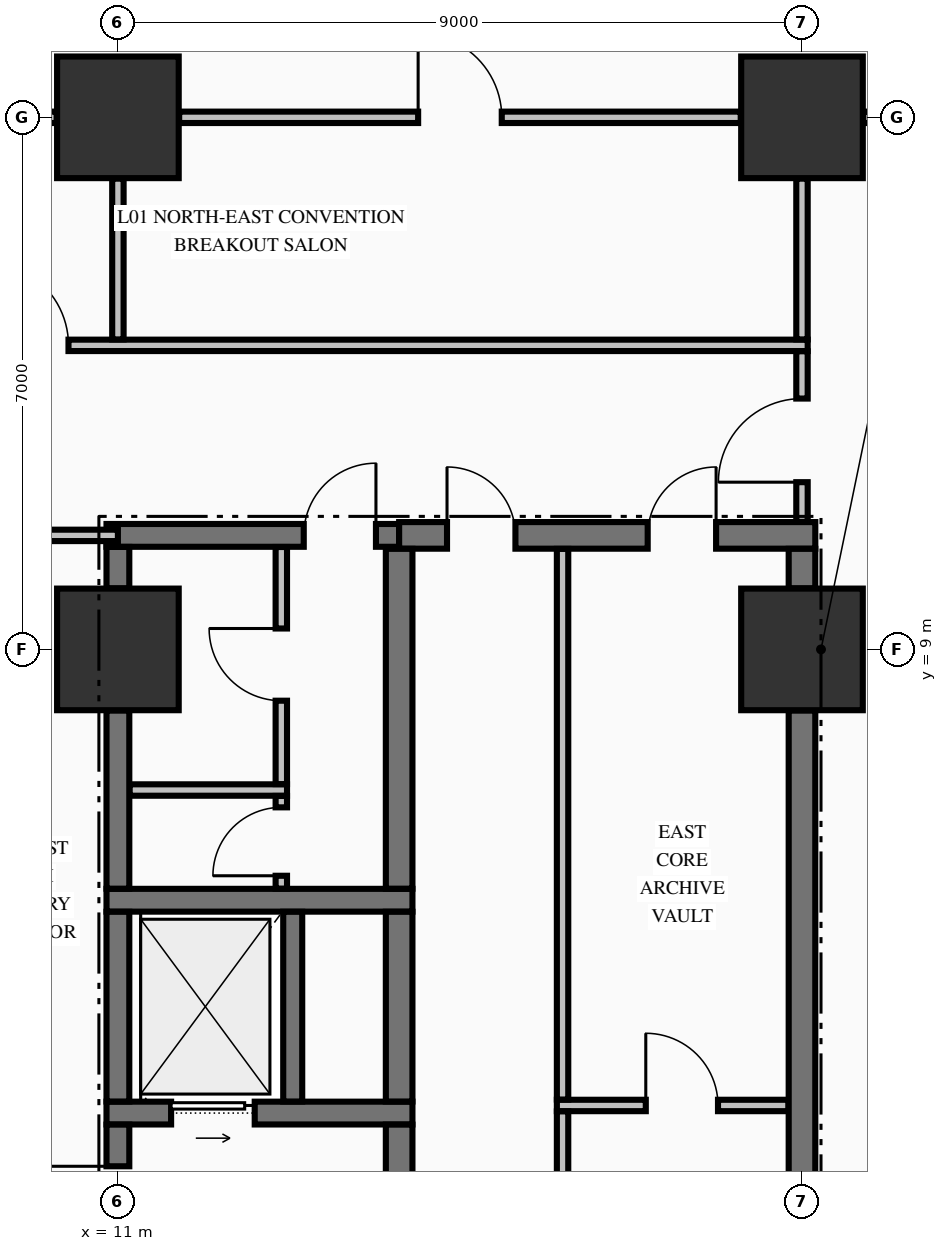
"""IFC4 building model, lengths in metres.
Left out: names, types, materials, properties, quantities, classifications, styles, units other than length and angle.
Written with IfcOpenShell. Run it as: python <this file> out.ifc"""

import sys

from ifc_helpers import new_model, si_unit, direction, frame, frame_2d, origin, origin_2d, place, context, subcontext, project, spatial, rectangle, extrude, element, fill, save


model = new_model("IFC4")
c1 = context("Model", 3, precision=1e-05, world=origin(), true_north=direction((0.0, 1.0)))
c2 = subcontext(c1, "Body", "Model", "MODEL_VIEW")
j1 = project(units=[si_unit("LENGTHUNIT", "METRE"), si_unit("PLANEANGLEUNIT", "RADIAN")], contexts=[c1])
p1 = place(None, origin())
s1 = spatial("IfcSite", under=j1, at=p1, CompositionType="ELEMENT")
p2 = place(p1, origin())
s2 = spatial("IfcBuilding", under=s1, at=p2, CompositionType="ELEMENT")
p3 = place(p2, frame((0.0, 0.0, 5.44)))
s3 = spatial("IfcBuildingStorey", under=s2, at=p3, CompositionType="ELEMENT", Elevation=5.44)
for number, where, z_axis, x_axis in (
    (1, (11.0, 9.0, 0.0), (0.0, 0.0, 1.0), (1.0, 0.0, 0.0)),
    (2, (11.0, 16.0, 0.0), (0.0, 0.0, 1.0), (1.0, 0.0, 0.0)),
    (3, (20.0, 9.0, 0.0), (0.0, 0.0, 1.0), (1.0, 0.0, 0.0)),
    (4, (20.0, 16.0, 0.0), (0.0, 0.0, 1.0), (1.0, 0.0, 0.0)),
):
    element("IfcColumn", number, at=place(p3, frame(where, z_axis=z_axis, x_axis=x_axis)), inside=s3, PredefinedType="COLUMN", context=c2, shape_type="SweptSolid", body=[
        extrude(rectangle(XDim=1.6, YDim=1.6, at=origin_2d()), origin(), (0.0, 0.0, 1.0), 5.09),
    ])
p4 = place(p3, frame((10.85, 2.9, 0.0), z_axis=(0.0, 0.0, 1.0), x_axis=(1.0, 0.0, 0.0)))
e5 = element("IfcWall", 5, at=p4, inside=s3, PredefinedType="SHEAR", context=c2, shape_type="SweptSolid", body=[
    extrude(rectangle(XDim=4.025, YDim=0.3, at=frame_2d((2.012, 0.0))), origin(), (0.0, 0.0, 1.0), 5.09),
])
p5 = place(p4, frame((0.85, 0.0, 0.0)))
e6 = element("IfcOpeningElement", 6, at=p5, cuts=e5, PredefinedType="OPENING", context=c2, shape_type="SweptSolid", body=[
    extrude(rectangle(XDim=1.1, YDim=2.2, at=frame_2d((0.55, 1.1))), frame((0.0, 0.16, 0.0), z_axis=(0.0, -1.0, 0.0), x_axis=(1.0, 0.0, 0.0)), (0.0, 0.0, 1.0), 0.32),
])
p6 = place(p3, frame((10.85, 5.7, 0.0), z_axis=(0.0, 0.0, 1.0), x_axis=(1.0, 0.0, 0.0)))
e7 = element("IfcWall", 7, at=p6, inside=s3, PredefinedType="SHEAR", context=c2, shape_type="SweptSolid", body=[
    extrude(rectangle(XDim=4.025, YDim=0.3, at=frame_2d((2.012, 0.0))), origin(), (0.0, 0.0, 1.0), 5.09),
])
p7 = place(p3, frame((10.85, 10.5, 0.0), z_axis=(0.0, 0.0, 1.0), x_axis=(1.0, 0.0, 0.0)))
e8 = element("IfcWall", 8, at=p7, inside=s3, PredefinedType="SHEAR", context=c2, shape_type="SweptSolid", body=[
    extrude(rectangle(XDim=3.85, YDim=0.3, at=frame_2d((1.925, 0.0))), origin(), (0.0, 0.0, 1.0), 5.09),
])
p8 = place(p7, frame((2.595, 0.0, 0.0)))
e9 = element("IfcOpeningElement", 9, at=p8, cuts=e8, PredefinedType="OPENING", context=c2, shape_type="SweptSolid", body=[
    extrude(rectangle(XDim=0.95, YDim=2.15, at=frame_2d((0.475, 1.075))), frame((0.0, 0.16, 0.0), z_axis=(0.0, -1.0, 0.0), x_axis=(1.0, 0.0, 0.0)), (0.0, 0.0, 1.0), 0.32),
])
p9 = place(p3, frame((14.7, 10.5, 0.0), z_axis=(0.0, 0.0, 1.0), x_axis=(1.0, 0.0, 0.0)))
e10 = element("IfcWall", 10, at=p9, inside=s3, PredefinedType="SHEAR", context=c2, shape_type="SweptSolid", body=[
    extrude(rectangle(XDim=5.475, YDim=0.35, at=frame_2d((2.738, 0.0))), origin(), (0.0, 0.0, 1.0), 5.09),
])
p10 = place(p9, frame((0.63, 0.0, 0.0)))
e11 = element("IfcOpeningElement", 11, at=p10, cuts=e10, PredefinedType="OPENING", context=c2, shape_type="SweptSolid", body=[
    extrude(rectangle(XDim=0.9, YDim=2.15, at=frame_2d((0.45, 1.075))), frame((0.0, 0.185, 0.0), z_axis=(0.0, -1.0, 0.0), x_axis=(1.0, 0.0, 0.0)), (0.0, 0.0, 1.0), 0.37),
])
p11 = place(p9, frame((3.27, 0.0, 0.0)))
e12 = element("IfcOpeningElement", 12, at=p11, cuts=e10, PredefinedType="OPENING", context=c2, shape_type="SweptSolid", body=[
    extrude(rectangle(XDim=0.9, YDim=2.15, at=frame_2d((0.45, 1.075))), frame((0.0, 0.185, 0.0), z_axis=(0.0, -1.0, 0.0), x_axis=(1.0, 0.0, 0.0)), (0.0, 0.0, 1.0), 0.37),
])
p12 = place(p3, frame((16.775, 3.0, 0.0), z_axis=(0.0, 0.0, 1.0), x_axis=(1.0, 0.0, 0.0)))
e13 = element("IfcWall", 13, at=p12, inside=s3, PredefinedType="PARTITIONING", context=c2, shape_type="SweptSolid", body=[
    extrude(rectangle(XDim=3.047, YDim=0.15, at=frame_2d((1.523, 0.0))), origin(), (0.0, 0.0, 1.0), 5.09),
])
p13 = place(p12, frame((1.17, 0.0, 0.0)))
e14 = element("IfcOpeningElement", 14, at=p13, cuts=e13, PredefinedType="OPENING", context=c2, shape_type="SweptSolid", body=[
    extrude(rectangle(XDim=0.95, YDim=2.15, at=frame_2d((0.475, 1.075))), frame((0.0, 0.085, 0.0), z_axis=(0.0, -1.0, 0.0), x_axis=(1.0, 0.0, 0.0)), (0.0, 0.0, 1.0), 0.17),
])
p14 = place(p3, frame((11.153, 7.15, 0.0), z_axis=(0.0, 0.0, 1.0), x_axis=(1.0, 0.0, 0.0)))
e15 = element("IfcWall", 15, at=p14, inside=s3, PredefinedType="PARTITIONING", context=c2, shape_type="SweptSolid", body=[
    extrude(rectangle(XDim=2.072, YDim=0.15, at=frame_2d((1.036, 0.0))), origin(), (0.0, 0.0, 1.0), 5.09),
])
p15 = place(p3, frame((8.66, 10.5, 0.0), z_axis=(0.0, 0.0, 1.0), x_axis=(1.0, 0.0, 0.0)))
e16 = element("IfcWall", 16, at=p15, inside=s3, PredefinedType="PARTITIONING", context=c2, shape_type="SweptSolid", body=[
    extrude(rectangle(XDim=2.34, YDim=0.15, at=frame_2d((1.17, 0.0))), origin(), (0.0, 0.0, 1.0), 5.09),
])
p16 = place(p15, frame((0.27, 0.0, 0.0)))
e17 = element("IfcOpeningElement", 17, at=p16, cuts=e16, PredefinedType="OPENING", context=c2, shape_type="SweptSolid", body=[
    extrude(rectangle(XDim=1.1, YDim=2.15, at=frame_2d((0.55, 1.075))), frame((0.0, 0.085, 0.0), z_axis=(0.0, -1.0, 0.0), x_axis=(1.0, 0.0, 0.0)), (0.0, 0.0, 1.0), 0.17),
])
p17 = place(p3, frame((8.66, 13.0, 0.0), z_axis=(0.0, 0.0, 1.0), x_axis=(1.0, 0.0, 0.0)))
e18 = element("IfcWall", 18, at=p17, inside=s3, PredefinedType="PARTITIONING", context=c2, shape_type="SweptSolid", body=[
    extrude(rectangle(XDim=11.415, YDim=0.15, at=frame_2d((5.708, 0.0))), origin(), (0.0, 0.0, 1.0), 5.09),
])
p18 = place(p17, frame((0.59, 0.0, 0.0)))
e19 = element("IfcOpeningElement", 19, at=p18, cuts=e18, PredefinedType="OPENING", context=c2, shape_type="SweptSolid", body=[
    extrude(rectangle(XDim=1.1, YDim=2.15, at=frame_2d((0.55, 1.075))), frame((0.0, 0.085, 0.0), z_axis=(0.0, -1.0, 0.0), x_axis=(1.0, 0.0, 0.0)), (0.0, 0.0, 1.0), 0.17),
])
p19 = place(p3, frame((9.206, 16.0, 0.0), z_axis=(0.0, 0.0, 1.0), x_axis=(1.0, 0.0, 0.0)))
e20 = element("IfcWall", 20, at=p19, inside=s3, PredefinedType="PARTITIONING", context=c2, shape_type="SweptSolid", body=[
    extrude(rectangle(XDim=0.988, YDim=0.15, at=frame_2d((0.494, 0.0))), origin(), (0.0, 0.0, 1.0), 4.132),
])
p20 = place(p3, frame((11.806, 16.0, 0.0), z_axis=(0.0, 0.0, 1.0), x_axis=(1.0, 0.0, 0.0)))
e21 = element("IfcWall", 21, at=p20, inside=s3, PredefinedType="PARTITIONING", context=c2, shape_type="SweptSolid", body=[
    extrude(rectangle(XDim=7.388, YDim=0.15, at=frame_2d((3.694, 0.0))), origin(), (0.0, 0.0, 1.0), 4.132),
])
p21 = place(p20, frame((3.144, 0.0, 0.0)))
e22 = element("IfcOpeningElement", 22, at=p21, cuts=e21, PredefinedType="OPENING", context=c2, shape_type="SweptSolid", body=[
    extrude(rectangle(XDim=1.1, YDim=2.15, at=frame_2d((0.55, 1.075))), frame((0.0, 0.085, 0.0), z_axis=(0.0, -1.0, 0.0), x_axis=(1.0, 0.0, 0.0)), (0.0, 0.0, 1.0), 0.17),
])
p22 = place(p3, frame((20.806, 16.0, 0.0), z_axis=(0.0, 0.0, 1.0), x_axis=(1.0, 0.0, 0.0)))
e23 = element("IfcWall", 23, at=p22, inside=s3, PredefinedType="PARTITIONING", context=c2, shape_type="SweptSolid", body=[
    extrude(rectangle(XDim=4.488, YDim=0.15, at=frame_2d((2.244, 0.0))), origin(), (0.0, 0.0, 1.0), 4.132),
])
p23 = place(p22, frame((0.15, 0.0, 0.0)))
e24 = element("IfcOpeningElement", 24, at=p23, cuts=e23, PredefinedType="OPENING", context=c2, shape_type="SweptSolid", body=[
    extrude(rectangle(XDim=1.1, YDim=2.15, at=frame_2d((0.55, 1.075))), frame((0.0, 0.085, 0.0), z_axis=(0.0, -1.0, 0.0), x_axis=(1.0, 0.0, 0.0)), (0.0, 0.0, 1.0), 0.17),
])
p24 = place(p22, frame((2.844, 0.0, 0.0)))
e25 = element("IfcOpeningElement", 25, at=p24, cuts=e23, PredefinedType="OPENING", context=c2, shape_type="SweptSolid", body=[
    extrude(rectangle(XDim=1.1, YDim=2.15, at=frame_2d((0.55, 1.075))), frame((0.0, 0.085, 0.0), z_axis=(0.0, -1.0, 0.0), x_axis=(1.0, 0.0, 0.0)), (0.0, 0.0, 1.0), 0.17),
])
p25 = place(p3, frame((11.0, 0.804, 0.0), z_axis=(0.0, 0.0, 1.0), x_axis=(0.0, 1.0, 0.0)))
e26 = element("IfcWall", 26, at=p25, inside=s3, PredefinedType="SHEAR", context=c2, shape_type="SweptSolid", body=[
    extrude(rectangle(XDim=1.944, YDim=0.3, at=frame_2d((0.972, 0.0))), origin(), (0.0, 0.0, 1.0), 5.09),
])
p26 = place(p25, frame((0.296, 0.0, 0.0)))
e27 = element("IfcOpeningElement", 27, at=p26, cuts=e26, PredefinedType="OPENING", context=c2, shape_type="SweptSolid", body=[
    extrude(rectangle(XDim=1.1, YDim=2.15, at=frame_2d((0.55, 1.075))), frame((0.0, 0.16, 0.0), z_axis=(0.0, -1.0, 0.0), x_axis=(1.0, 0.0, 0.0)), (0.0, 0.0, 1.0), 0.32),
])
p27 = place(p3, frame((11.0, 3.052, 0.0), z_axis=(0.0, 0.0, 1.0), x_axis=(0.0, 1.0, 0.0)))
e28 = element("IfcWall", 28, at=p27, inside=s3, PredefinedType="SHEAR", context=c2, shape_type="SweptSolid", body=[
    extrude(rectangle(XDim=2.496, YDim=0.3, at=frame_2d((1.248, 0.0))), origin(), (0.0, 0.0, 1.0), 5.09),
])
p28 = place(p3, frame((11.0, 5.852, 0.0), z_axis=(0.0, 0.0, 1.0), x_axis=(0.0, 1.0, 0.0)))
e29 = element("IfcWall", 29, at=p28, inside=s3, PredefinedType="SHEAR", context=c2, shape_type="SweptSolid", body=[
    extrude(rectangle(XDim=2.344, YDim=0.3, at=frame_2d((1.172, 0.0))), origin(), (0.0, 0.0, 1.0), 5.09),
])
p29 = place(p3, frame((11.0, 9.804, 0.0), z_axis=(0.0, 0.0, 1.0), x_axis=(0.0, 1.0, 0.0)))
e30 = element("IfcWall", 30, at=p29, inside=s3, PredefinedType="SHEAR", context=c2, shape_type="SweptSolid", body=[
    extrude(rectangle(XDim=0.544, YDim=0.3, at=frame_2d((0.272, 0.0))), origin(), (0.0, 0.0, 1.0), 5.09),
])
p30 = place(p3, frame((13.3, 3.052, 0.0), z_axis=(0.0, 0.0, 1.0), x_axis=(0.0, 1.0, 0.0)))
e31 = element("IfcWall", 31, at=p30, inside=s3, PredefinedType="SOLIDWALL", context=c2, shape_type="SweptSolid", body=[
    extrude(rectangle(XDim=2.496, YDim=0.25, at=frame_2d((1.248, 0.0))), origin(), (0.0, 0.0, 1.0), 5.09),
])
p31 = place(p3, frame((14.7, -0.098, 0.0), z_axis=(0.0, 0.0, 1.0), x_axis=(0.0, 1.0, 0.0)))
e32 = element("IfcWall", 32, at=p31, inside=s3, PredefinedType="SHEAR", context=c2, shape_type="SweptSolid", body=[
    extrude(rectangle(XDim=2.846, YDim=0.35, at=frame_2d((1.423, 0.0))), origin(), (0.0, 0.0, 1.0), 5.09),
])
p32 = place(p3, frame((14.7, 3.052, 0.0), z_axis=(0.0, 0.0, 1.0), x_axis=(0.0, 1.0, 0.0)))
e33 = element("IfcWall", 33, at=p32, inside=s3, PredefinedType="SHEAR", context=c2, shape_type="SweptSolid", body=[
    extrude(rectangle(XDim=2.496, YDim=0.35, at=frame_2d((1.248, 0.0))), origin(), (0.0, 0.0, 1.0), 5.09),
])
p33 = place(p3, frame((14.7, 5.852, 0.0), z_axis=(0.0, 0.0, 1.0), x_axis=(0.0, 1.0, 0.0)))
e34 = element("IfcWall", 34, at=p33, inside=s3, PredefinedType="SHEAR", context=c2, shape_type="SweptSolid", body=[
    extrude(rectangle(XDim=4.471, YDim=0.35, at=frame_2d((2.235, 0.0))), origin(), (0.0, 0.0, 1.0), 5.09),
])
p34 = place(p3, frame((20.0, 0.804, 0.0), z_axis=(0.0, 0.0, 1.0), x_axis=(0.0, 1.0, 0.0)))
e35 = element("IfcWall", 35, at=p34, inside=s3, PredefinedType="SHEAR", context=c2, shape_type="SweptSolid", body=[
    extrude(rectangle(XDim=7.392, YDim=0.35, at=frame_2d((3.696, 0.0))), origin(), (0.0, 0.0, 1.0), 5.09),
])
p35 = place(p3, frame((20.0, 9.804, 0.0), z_axis=(0.0, 0.0, 1.0), x_axis=(0.0, 1.0, 0.0)))
e36 = element("IfcWall", 36, at=p35, inside=s3, PredefinedType="SHEAR", context=c2, shape_type="SweptSolid", body=[
    extrude(rectangle(XDim=0.519, YDim=0.35, at=frame_2d((0.26, 0.0))), origin(), (0.0, 0.0, 1.0), 5.09),
])
p36 = place(p3, frame((11.0, 13.078, 0.0), z_axis=(0.0, 0.0, 1.0), x_axis=(0.0, 1.0, 0.0)))
e37 = element("IfcWall", 37, at=p36, inside=s3, PredefinedType="PARTITIONING", context=c2, shape_type="SweptSolid", body=[
    extrude(rectangle(XDim=2.116, YDim=0.15, at=frame_2d((1.058, 0.0))), origin(), (0.0, 0.0, 1.0), 4.132),
])
p37 = place(p3, frame((13.15, 5.853, 0.0), z_axis=(0.0, 0.0, 1.0), x_axis=(0.0, 1.0, 0.0)))
e38 = element("IfcWall", 38, at=p37, inside=s3, PredefinedType="PARTITIONING", context=c2, shape_type="SweptSolid", body=[
    extrude(rectangle(XDim=1.219, YDim=0.15, at=frame_2d((0.609, 0.0))), origin(), (0.0, 0.0, 1.0), 5.09),
])
p38 = place(p37, frame((0.169, 0.0, 0.0)))
e39 = element("IfcOpeningElement", 39, at=p38, cuts=e38, PredefinedType="OPENING", context=c2, shape_type="SweptSolid", body=[
    extrude(rectangle(XDim=0.9, YDim=2.15, at=frame_2d((0.45, 1.075))), frame((0.0, 0.085, 0.0), z_axis=(0.0, -1.0, 0.0), x_axis=(1.0, 0.0, 0.0)), (0.0, 0.0, 1.0), 0.17),
])
p39 = place(p3, frame((13.15, 7.228, 0.0), z_axis=(0.0, 0.0, 1.0), x_axis=(0.0, 1.0, 0.0)))
e40 = element("IfcWall", 40, at=p39, inside=s3, PredefinedType="PARTITIONING", context=c2, shape_type="SweptSolid", body=[
    extrude(rectangle(XDim=3.119, YDim=0.15, at=frame_2d((1.56, 0.0))), origin(), (0.0, 0.0, 1.0), 5.09),
])
p40 = place(p39, frame((1.097, 0.0, 0.0)))
e41 = element("IfcOpeningElement", 41, at=p40, cuts=e40, PredefinedType="OPENING", context=c2, shape_type="SweptSolid", body=[
    extrude(rectangle(XDim=0.95, YDim=2.15, at=frame_2d((0.475, 1.075))), frame((0.0, 0.085, 0.0), z_axis=(0.0, -1.0, 0.0), x_axis=(1.0, 0.0, 0.0)), (0.0, 0.0, 1.0), 0.17),
])
p41 = place(p3, frame((16.85, -4.447, 0.0), z_axis=(0.0, 0.0, 1.0), x_axis=(0.0, 1.0, 0.0)))
e42 = element("IfcWall", 42, at=p41, inside=s3, PredefinedType="PARTITIONING", context=c2, shape_type="SweptSolid", body=[
    extrude(rectangle(XDim=7.369, YDim=0.15, at=frame_2d((3.685, 0.0))), origin(), (0.0, 0.0, 1.0), 5.09),
])
p42 = place(p3, frame((16.85, 3.078, 0.0), z_axis=(0.0, 0.0, 1.0), x_axis=(0.0, 1.0, 0.0)))
e43 = element("IfcWall", 43, at=p42, inside=s3, PredefinedType="PARTITIONING", context=c2, shape_type="SweptSolid", body=[
    extrude(rectangle(XDim=7.244, YDim=0.15, at=frame_2d((3.622, 0.0))), origin(), (0.0, 0.0, 1.0), 5.09),
])
p43 = place(p3, frame((20.0, 10.678, 0.0), z_axis=(0.0, 0.0, 1.0), x_axis=(0.0, 1.0, 0.0)))
e44 = element("IfcWall", 44, at=p43, inside=s3, PredefinedType="PARTITIONING", context=c2, shape_type="SweptSolid", body=[
    extrude(rectangle(XDim=2.244, YDim=0.15, at=frame_2d((1.122, 0.0))), origin(), (0.0, 0.0, 1.0), 4.132),
])
p44 = place(p43, frame((0.522, 0.0, 0.0)))
e45 = element("IfcOpeningElement", 45, at=p44, cuts=e44, PredefinedType="OPENING", context=c2, shape_type="SweptSolid", body=[
    extrude(rectangle(XDim=1.1, YDim=2.15, at=frame_2d((0.55, 1.075))), frame((0.0, 0.085, 0.0), z_axis=(0.0, -1.0, 0.0), x_axis=(1.0, 0.0, 0.0)), (0.0, 0.0, 1.0), 0.17),
])
p45 = place(p3, frame((20.0, 13.078, 0.0), z_axis=(0.0, 0.0, 1.0), x_axis=(0.0, 1.0, 0.0)))
e46 = element("IfcWall", 46, at=p45, inside=s3, PredefinedType="PARTITIONING", context=c2, shape_type="SweptSolid", body=[
    extrude(rectangle(XDim=2.116, YDim=0.15, at=frame_2d((1.058, 0.0))), origin(), (0.0, 0.0, 1.0), 4.132),
])
p46 = place(p26, origin())
e47 = element("IfcDoor", 47, at=p46, inside=s3, OperationType="SINGLE_SWING_RIGHT", PredefinedType="DOOR", context=c2, shape_type="SweptSolid", body=[
    extrude(rectangle(XDim=1.1, YDim=2.15, at=frame_2d((0.55, 1.075))), frame((0.0, 0.025, 0.0), z_axis=(0.0, -1.0, 0.0), x_axis=(1.0, 0.0, 0.0)), (0.0, 0.0, 1.0), 0.05),
])
fill(e27, e47)
p47 = place(p5, origin())
e48 = element("IfcDoor", 48, at=p47, inside=s3, OperationType="SLIDING_TO_RIGHT", PredefinedType="DOOR", context=c2, shape_type="SweptSolid", body=[
    extrude(rectangle(XDim=1.1, YDim=2.2, at=frame_2d((0.55, 1.1))), frame((0.0, 0.025, 0.0), z_axis=(0.0, -1.0, 0.0), x_axis=(1.0, 0.0, 0.0)), (0.0, 0.0, 1.0), 0.05),
])
fill(e6, e48)
p48 = place(p8, origin())
e49 = element("IfcDoor", 49, at=p48, inside=s3, OperationType="SINGLE_SWING_RIGHT", PredefinedType="DOOR", context=c2, shape_type="SweptSolid", body=[
    extrude(rectangle(XDim=0.95, YDim=2.15, at=frame_2d((0.475, 1.075))), frame((0.0, 0.025, 0.0), z_axis=(0.0, -1.0, 0.0), x_axis=(1.0, 0.0, 0.0)), (0.0, 0.0, 1.0), 0.05),
])
fill(e9, e49)
p49 = place(p38, origin())
e50 = element("IfcDoor", 50, at=p49, inside=s3, OperationType="SINGLE_SWING_LEFT", PredefinedType="DOOR", context=c2, shape_type="SweptSolid", body=[
    extrude(rectangle(XDim=0.9, YDim=2.15, at=frame_2d((0.45, 1.075))), frame((0.0, 0.025, 0.0), z_axis=(0.0, -1.0, 0.0), x_axis=(1.0, 0.0, 0.0)), (0.0, 0.0, 1.0), 0.05),
])
fill(e39, e50)
p50 = place(p40, origin())
e51 = element("IfcDoor", 51, at=p50, inside=s3, OperationType="SINGLE_SWING_RIGHT", PredefinedType="DOOR", context=c2, shape_type="SweptSolid", body=[
    extrude(rectangle(XDim=0.95, YDim=2.15, at=frame_2d((0.475, 1.075))), frame((0.0, 0.025, 0.0), z_axis=(0.0, -1.0, 0.0), x_axis=(1.0, 0.0, 0.0)), (0.0, 0.0, 1.0), 0.05),
])
fill(e41, e51)
p51 = place(p10, origin())
e52 = element("IfcDoor", 52, at=p51, inside=s3, OperationType="SINGLE_SWING_LEFT", PredefinedType="DOOR", context=c2, shape_type="SweptSolid", body=[
    extrude(rectangle(XDim=0.9, YDim=2.15, at=frame_2d((0.45, 1.075))), frame((0.0, 0.025, 0.0), z_axis=(0.0, -1.0, 0.0), x_axis=(1.0, 0.0, 0.0)), (0.0, 0.0, 1.0), 0.05),
])
fill(e11, e52)
p52 = place(p11, origin())
e53 = element("IfcDoor", 53, at=p52, inside=s3, OperationType="SINGLE_SWING_RIGHT", PredefinedType="DOOR", context=c2, shape_type="SweptSolid", body=[
    extrude(rectangle(XDim=0.9, YDim=2.15, at=frame_2d((0.45, 1.075))), frame((0.0, 0.025, 0.0), z_axis=(0.0, -1.0, 0.0), x_axis=(1.0, 0.0, 0.0)), (0.0, 0.0, 1.0), 0.05),
])
fill(e12, e53)
p53 = place(p13, origin())
e54 = element("IfcDoor", 54, at=p53, inside=s3, OperationType="SINGLE_SWING_LEFT", PredefinedType="DOOR", context=c2, shape_type="SweptSolid", body=[
    extrude(rectangle(XDim=0.95, YDim=2.15, at=frame_2d((0.475, 1.075))), frame((0.0, 0.025, 0.0), z_axis=(0.0, -1.0, 0.0), x_axis=(1.0, 0.0, 0.0)), (0.0, 0.0, 1.0), 0.05),
])
fill(e14, e54)
p54 = place(p21, origin())
e55 = element("IfcDoor", 55, at=p54, inside=s3, OperationType="SINGLE_SWING_LEFT", PredefinedType="DOOR", context=c2, shape_type="SweptSolid", body=[
    extrude(rectangle(XDim=1.1, YDim=2.15, at=frame_2d((0.55, 1.075))), frame((0.0, 0.025, 0.0), z_axis=(0.0, -1.0, 0.0), x_axis=(1.0, 0.0, 0.0)), (0.0, 0.0, 1.0), 0.05),
])
fill(e22, e55)
p55 = place(p18, origin())
e56 = element("IfcDoor", 56, at=p55, inside=s3, OperationType="SINGLE_SWING_LEFT", PredefinedType="DOOR", context=c2, shape_type="SweptSolid", body=[
    extrude(rectangle(XDim=1.1, YDim=2.15, at=frame_2d((0.55, 1.075))), frame((0.0, 0.025, 0.0), z_axis=(0.0, -1.0, 0.0), x_axis=(1.0, 0.0, 0.0)), (0.0, 0.0, 1.0), 0.05),
])
fill(e19, e56)
p56 = place(p44, origin())
e57 = element("IfcDoor", 57, at=p56, inside=s3, OperationType="SINGLE_SWING_LEFT", PredefinedType="DOOR", context=c2, shape_type="SweptSolid", body=[
    extrude(rectangle(XDim=1.1, YDim=2.15, at=frame_2d((0.55, 1.075))), frame((0.0, 0.025, 0.0), z_axis=(0.0, -1.0, 0.0), x_axis=(1.0, 0.0, 0.0)), (0.0, 0.0, 1.0), 0.05),
])
fill(e45, e57)
save(model, sys.argv[1])
